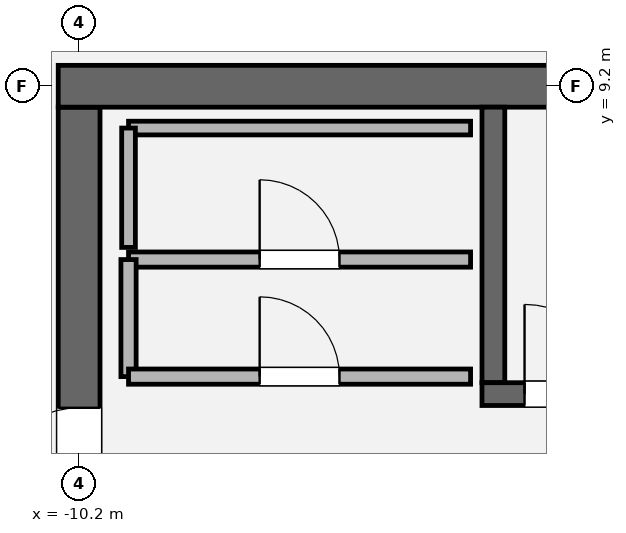
"""IFC4 building model, lengths in metres.
Left out: names, types, materials, properties, quantities, classifications, styles, units other than length and angle.
Written with IfcOpenShell. Run it as: python <this file> out.ifc"""

import sys

from ifc_helpers import new_model, si_unit, direction, frame, frame_2d, origin, place, context, subcontext, project, spatial, rectangle, extrude, element, fill, save


model = new_model("IFC4")
c1 = context("Model", 3, precision=1e-05, world=origin(), true_north=direction((0.0, 1.0)))
c2 = subcontext(c1, "Body", "Model", "MODEL_VIEW")
j1 = project(units=[si_unit("LENGTHUNIT", "METRE"), si_unit("PLANEANGLEUNIT", "RADIAN")], contexts=[c1])
p1 = place(None, origin())
s1 = spatial("IfcSite", under=j1, at=p1, CompositionType="ELEMENT")
p2 = place(p1, origin())
s2 = spatial("IfcBuilding", under=s1, at=p2, CompositionType="ELEMENT")
p3 = place(p2, frame((0.0, 0.0, 283.8)))
s3 = spatial("IfcBuildingStorey", under=s2, at=p3, CompositionType="ELEMENT", Elevation=283.8)
p4 = place(p3, frame((-10.2, -8.925, 0.0), z_axis=(0.0, 0.0, 1.0), x_axis=(0.0, 1.0, 0.0)))
e1 = element("IfcWall", 1, at=p4, inside=s3, PredefinedType="SHEAR", context=c2, shape_type="SweptSolid", body=[
    extrude(rectangle(XDim=17.85, YDim=0.55, at=frame_2d((8.925, 0.0))), origin(), (0.0, 0.0, 1.0), 4.2),
])
p5 = place(p4, frame((12.715, 0.0, 0.0)))
e2 = element("IfcOpeningElement", 2, at=p5, cuts=e1, PredefinedType="OPENING", context=c2, shape_type="SweptSolid", body=[
    extrude(rectangle(XDim=1.18, YDim=2.2, at=frame_2d((0.59, 1.1))), frame((0.0, 0.285, 0.0), z_axis=(0.0, -1.0, 0.0), x_axis=(1.0, 0.0, 0.0)), (0.0, 0.0, 1.0), 0.57),
])
p6 = place(p3, frame((-10.475, 9.2, 0.0), z_axis=(0.0, 0.0, 1.0), x_axis=(1.0, 0.0, 0.0)))
e3 = element("IfcWall", 3, at=p6, inside=s3, PredefinedType="SHEAR", context=c2, shape_type="SweptSolid", body=[
    extrude(rectangle(XDim=20.95, YDim=0.55, at=frame_2d((10.475, 0.0))), origin(), (0.0, 0.0, 1.0), 4.2),
])
p7 = place(p3, frame((-4.75, 5.3, 0.0), z_axis=(0.0, 0.0, 1.0), x_axis=(0.0, 1.0, 0.0)))
e4 = element("IfcWall", 4, at=p7, inside=s3, PredefinedType="SOLIDWALL", context=c2, shape_type="SweptSolid", body=[
    extrude(rectangle(XDim=3.625, YDim=0.3, at=frame_2d((1.812, 0.0))), origin(), (0.0, 0.0, 1.0), 4.2),
])
p8 = place(p3, frame((-4.9, 5.15, 0.0), z_axis=(0.0, 0.0, 1.0), x_axis=(1.0, 0.0, 0.0)))
e5 = element("IfcWall", 5, at=p8, inside=s3, PredefinedType="SOLIDWALL", context=c2, shape_type="SweptSolid", body=[
    extrude(rectangle(XDim=9.8, YDim=0.3, at=frame_2d((4.9, 0.0))), origin(), (0.0, 0.0, 1.0), 4.2),
])
p9 = place(p8, frame((0.56, 0.0, 0.0)))
e6 = element("IfcOpeningElement", 6, at=p9, cuts=e5, PredefinedType="OPENING", context=c2, shape_type="SweptSolid", body=[
    extrude(rectangle(XDim=1.18, YDim=2.2, at=frame_2d((0.59, 1.1))), frame((0.0, 0.16, 0.0), z_axis=(0.0, -1.0, 0.0), x_axis=(1.0, 0.0, 0.0)), (0.0, 0.0, 1.0), 0.32),
])
p10 = place(p3, frame((-5.05, 6.92, 0.0), z_axis=(0.0, 0.0, 1.0), x_axis=(-1.0, 0.0, 0.0)))
e7 = element("IfcWall", 7, at=p10, inside=s3, PredefinedType="SOLIDWALL", context=c2, shape_type="SweptSolid", body=[
    extrude(rectangle(XDim=4.5, YDim=0.2, at=frame_2d((2.25, 0.0))), origin(), (0.0, 0.0, 1.0), 4.0),
])
p11 = place(p10, frame((1.725, 0.0, 0.0)))
e8 = element("IfcOpeningElement", 8, at=p11, cuts=e7, PredefinedType="OPENING", context=c2, shape_type="SweptSolid", body=[
    extrude(rectangle(XDim=1.05, YDim=2.2, at=frame_2d((0.525, 1.1))), frame((0.0, 0.11, 0.0), z_axis=(0.0, -1.0, 0.0), x_axis=(1.0, 0.0, 0.0)), (0.0, 0.0, 1.0), 0.22),
])
p12 = place(p3, frame((-9.55, 6.92, 0.0), z_axis=(0.0, 0.0, 1.0), x_axis=(0.0, -1.0, 0.0)))
e9 = element("IfcWall", 9, at=p12, inside=s3, PredefinedType="SOLIDWALL", context=c2, shape_type="SweptSolid", body=[
    extrude(rectangle(XDim=1.54, YDim=0.2, at=frame_2d((0.77, 0.0))), origin(), (0.0, 0.0, 1.0), 4.0),
])
p13 = place(p3, frame((-9.55, 5.38, 0.0), z_axis=(0.0, 0.0, 1.0), x_axis=(1.0, 0.0, 0.0)))
e10 = element("IfcWall", 10, at=p13, inside=s3, PredefinedType="SOLIDWALL", context=c2, shape_type="SweptSolid", body=[
    extrude(rectangle(XDim=4.5, YDim=0.2, at=frame_2d((2.25, 0.0))), origin(), (0.0, 0.0, 1.0), 4.0),
])
p14 = place(p13, frame((1.725, 0.0, 0.0)))
e11 = element("IfcOpeningElement", 11, at=p14, cuts=e10, PredefinedType="OPENING", context=c2, shape_type="SweptSolid", body=[
    extrude(rectangle(XDim=1.05, YDim=2.2, at=frame_2d((0.525, 1.1))), frame((0.0, 0.11, 0.0), z_axis=(0.0, -1.0, 0.0), x_axis=(1.0, 0.0, 0.0)), (0.0, 0.0, 1.0), 0.22),
])
p15 = place(p3, frame((-5.05, 8.65, 0.0), z_axis=(0.0, 0.0, 1.0), x_axis=(-1.0, 0.0, 0.0)))
e12 = element("IfcWall", 12, at=p15, inside=s3, PredefinedType="PARTITIONING", context=c2, shape_type="SweptSolid", body=[
    extrude(rectangle(XDim=4.5, YDim=0.18, at=frame_2d((2.25, 0.0))), origin(), (0.0, 0.0, 1.0), 4.0),
])
p16 = place(p3, frame((-9.55, 8.65, 0.0), z_axis=(0.0, 0.0, 1.0), x_axis=(0.0, -1.0, 0.0)))
e13 = element("IfcWall", 13, at=p16, inside=s3, PredefinedType="PARTITIONING", context=c2, shape_type="SweptSolid", body=[
    extrude(rectangle(XDim=1.57, YDim=0.18, at=frame_2d((0.785, 0.0))), origin(), (0.0, 0.0, 1.0), 4.0),
])
p17 = place(p9, origin())
e14 = element("IfcDoor", 14, at=p17, inside=s3, OperationType="SINGLE_SWING_LEFT", PredefinedType="DOOR", context=c2, shape_type="SweptSolid", body=[
    extrude(rectangle(XDim=1.18, YDim=2.2, at=frame_2d((0.59, 1.1))), frame((0.0, 0.025, 0.0), z_axis=(0.0, -1.0, 0.0), x_axis=(1.0, 0.0, 0.0)), (0.0, 0.0, 1.0), 0.05),
])
fill(e6, e14)
p18 = place(p5, origin())
e15 = element("IfcDoor", 15, at=p18, inside=s3, OperationType="SINGLE_SWING_LEFT", PredefinedType="DOOR", context=c2, shape_type="SweptSolid", body=[
    extrude(rectangle(XDim=1.18, YDim=2.2, at=frame_2d((0.59, 1.1))), frame((0.0, 0.025, 0.0), z_axis=(0.0, -1.0, 0.0), x_axis=(1.0, 0.0, 0.0)), (0.0, 0.0, 1.0), 0.05),
])
fill(e2, e15)
p19 = place(p14, origin())
e16 = element("IfcDoor", 16, at=p19, inside=s3, OperationType="SINGLE_SWING_LEFT", PredefinedType="DOOR", context=c2, shape_type="SweptSolid", body=[
    extrude(rectangle(XDim=1.05, YDim=2.2, at=frame_2d((0.525, 1.1))), frame((0.0, 0.025, 0.0), z_axis=(0.0, -1.0, 0.0), x_axis=(1.0, 0.0, 0.0)), (0.0, 0.0, 1.0), 0.05),
])
fill(e11, e16)
p20 = place(p11, origin())
e17 = element("IfcDoor", 17, at=p20, inside=s3, OperationType="SINGLE_SWING_RIGHT", PredefinedType="DOOR", context=c2, shape_type="SweptSolid", body=[
    extrude(rectangle(XDim=1.05, YDim=2.2, at=frame_2d((0.525, 1.1))), frame((0.0, 0.025, 0.0), z_axis=(0.0, -1.0, 0.0), x_axis=(1.0, 0.0, 0.0)), (0.0, 0.0, 1.0), 0.05),
])
fill(e8, e17)
save(model, sys.argv[1])
